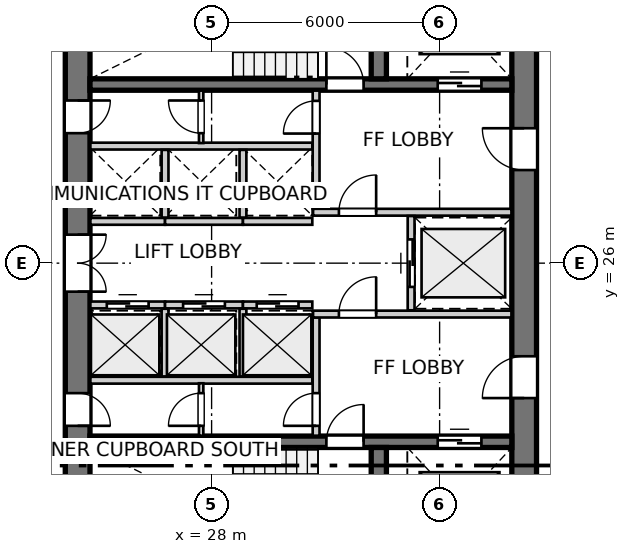
"""IFC4 building model, lengths in metres.
Left out: names, types, materials, properties, quantities, classifications, styles, units other than length and angle.
Written with IfcOpenShell. Run it as: python <this file> out.ifc"""

import sys

from ifc_helpers import new_model, si_unit, direction, frame, frame_2d, origin, place, context, subcontext, project, spatial, rectangle, extrude, source, transform, mapped, element, fill, save


model = new_model("IFC4")
c1 = context("Model", 3, precision=1e-05, world=origin(), true_north=direction((0.0, 1.0)))
c2 = subcontext(c1, "Body", "Model", "MODEL_VIEW")
j1 = project(units=[si_unit("LENGTHUNIT", "METRE"), si_unit("PLANEANGLEUNIT", "RADIAN")], contexts=[c1])
p1 = place(None, origin())
s1 = spatial("IfcSite", under=j1, at=p1, CompositionType="ELEMENT")
p2 = place(p1, origin())
s2 = spatial("IfcBuilding", under=s1, at=p2, CompositionType="ELEMENT")
p3 = place(p2, frame((0.0, 0.0, 108.8)))
s3 = spatial("IfcBuildingStorey", under=s2, at=p3, CompositionType="ELEMENT", Elevation=108.8)
p4 = place(p3, frame((24.475, 33.8, 0.0), z_axis=(0.0, 0.0, 1.0), x_axis=(0.0, -1.0, 0.0)))
e1 = element("IfcWall", 1, at=p4, inside=s3, PredefinedType="SHEAR", context=c2, shape_type="SweptSolid", body=[
    extrude(rectangle(XDim=15.6, YDim=0.65, at=frame_2d((7.8, 0.0))), origin(), (0.0, 0.0, 1.0), 2.935),
])
p5 = place(p4, frame((7.05, 0.0, 0.0)))
e2 = element("IfcOpeningElement", 2, at=p5, cuts=e1, PredefinedType="OPENING", context=c2, shape_type="SweptSolid", body=[
    extrude(rectangle(XDim=1.5, YDim=2.15, at=frame_2d((0.75, 1.075))), frame((0.0, 0.335, 0.0), z_axis=(0.0, -1.0, 0.0), x_axis=(1.0, 0.0, 0.0)), (0.0, 0.0, 1.0), 0.67),
])
p6 = place(p4, frame((3.52, 0.0, 0.0)))
e3 = element("IfcOpeningElement", 3, at=p6, cuts=e1, PredefinedType="OPENING", context=c2, shape_type="SweptSolid", body=[
    extrude(rectangle(XDim=0.86, YDim=2.05, at=frame_2d((0.43, 1.025))), frame((0.0, 0.335, 0.0), z_axis=(0.0, -1.0, 0.0), x_axis=(1.0, 0.0, 0.0)), (0.0, 0.0, 1.0), 0.67),
])
p7 = place(p4, frame((11.22, 0.0, 0.0)))
e4 = element("IfcOpeningElement", 4, at=p7, cuts=e1, PredefinedType="OPENING", context=c2, shape_type="SweptSolid", body=[
    extrude(rectangle(XDim=0.86, YDim=2.05, at=frame_2d((0.43, 1.025))), frame((0.0, 0.335, 0.0), z_axis=(0.0, -1.0, 0.0), x_axis=(1.0, 0.0, 0.0)), (0.0, 0.0, 1.0), 0.67),
])
p8 = place(p3, frame((36.225, 18.2, 0.0), z_axis=(0.0, 0.0, 1.0), x_axis=(0.0, 1.0, 0.0)))
e5 = element("IfcWall", 5, at=p8, inside=s3, PredefinedType="SHEAR", context=c2, shape_type="SweptSolid", body=[
    extrude(rectangle(XDim=15.6, YDim=0.65, at=frame_2d((7.8, 0.0))), origin(), (0.0, 0.0, 1.0), 2.935),
])
p9 = place(p8, frame((4.25, 0.0, 0.0)))
e6 = element("IfcOpeningElement", 6, at=p9, cuts=e5, PredefinedType="OPENING", context=c2, shape_type="SweptSolid", body=[
    extrude(rectangle(XDim=1.1, YDim=2.15, at=frame_2d((0.55, 1.075))), frame((0.0, 0.335, 0.0), z_axis=(0.0, -1.0, 0.0), x_axis=(1.0, 0.0, 0.0)), (0.0, 0.0, 1.0), 0.67),
])
p10 = place(p8, frame((10.25, 0.0, 0.0)))
e7 = element("IfcOpeningElement", 7, at=p10, cuts=e5, PredefinedType="OPENING", context=c2, shape_type="SweptSolid", body=[
    extrude(rectangle(XDim=1.1, YDim=2.15, at=frame_2d((0.55, 1.075))), frame((0.0, 0.335, 0.0), z_axis=(0.0, -1.0, 0.0), x_axis=(1.0, 0.0, 0.0)), (0.0, 0.0, 1.0), 0.67),
])
p11 = place(p3, frame((24.8, 21.3, 0.0), z_axis=(0.0, 0.0, 1.0), x_axis=(1.0, 0.0, 0.0)))
e8 = element("IfcWall", 8, at=p11, inside=s3, PredefinedType="SHEAR", context=c2, shape_type="SweptSolid", body=[
    extrude(rectangle(XDim=11.1, YDim=0.3, at=frame_2d((5.55, 0.0))), origin(), (0.0, 0.0, 1.0), 2.935),
])
p12 = place(p11, frame((6.22, 0.0, 0.0)))
e9 = element("IfcOpeningElement", 9, at=p12, cuts=e8, PredefinedType="OPENING", context=c2, shape_type="SweptSolid", body=[
    extrude(rectangle(XDim=0.98, YDim=2.15, at=frame_2d((0.49, 1.075))), frame((0.0, 0.16, 0.0), z_axis=(0.0, -1.0, 0.0), x_axis=(1.0, 0.0, 0.0)), (0.0, 0.0, 1.0), 0.32),
])
p13 = place(p11, frame((9.15, 0.0, 0.0)))
e10 = element("IfcOpeningElement", 10, at=p13, cuts=e8, PredefinedType="OPENING", context=c2, shape_type="SweptSolid", body=[
    extrude(rectangle(XDim=1.15, YDim=2.15, at=frame_2d((0.575, 1.075))), frame((0.0, 0.16, 0.0), z_axis=(0.0, -1.0, 0.0), x_axis=(1.0, 0.0, 0.0)), (0.0, 0.0, 1.0), 0.32),
])
p14 = place(p3, frame((32.4, 18.2, 0.0), z_axis=(0.0, 0.0, 1.0), x_axis=(0.0, 1.0, 0.0)))
e11 = element("IfcWall", 11, at=p14, inside=s3, PredefinedType="SHEAR", context=c2, shape_type="SweptSolid", body=[
    extrude(rectangle(XDim=2.95, YDim=0.4, at=frame_2d((1.475, 0.0))), origin(), (0.0, 0.0, 1.0), 2.935),
])
p15 = place(p3, frame((24.8, 30.7, 0.0), z_axis=(0.0, 0.0, 1.0), x_axis=(1.0, 0.0, 0.0)))
e12 = element("IfcWall", 12, at=p15, inside=s3, PredefinedType="SHEAR", context=c2, shape_type="SweptSolid", body=[
    extrude(rectangle(XDim=11.1, YDim=0.3, at=frame_2d((5.55, 0.0))), origin(), (0.0, 0.0, 1.0), 2.935),
])
p16 = place(p15, frame((6.22, 0.0, 0.0)))
e13 = element("IfcOpeningElement", 13, at=p16, cuts=e12, PredefinedType="OPENING", context=c2, shape_type="SweptSolid", body=[
    extrude(rectangle(XDim=0.98, YDim=2.15, at=frame_2d((0.49, 1.075))), frame((0.0, 0.16, 0.0), z_axis=(0.0, -1.0, 0.0), x_axis=(1.0, 0.0, 0.0)), (0.0, 0.0, 1.0), 0.32),
])
p17 = place(p15, frame((9.15, 0.0, 0.0)))
e14 = element("IfcOpeningElement", 14, at=p17, cuts=e12, PredefinedType="OPENING", context=c2, shape_type="SweptSolid", body=[
    extrude(rectangle(XDim=1.15, YDim=2.15, at=frame_2d((0.575, 1.075))), frame((0.0, 0.16, 0.0), z_axis=(0.0, -1.0, 0.0), x_axis=(1.0, 0.0, 0.0)), (0.0, 0.0, 1.0), 0.32),
])
p18 = place(p3, frame((32.4, 30.85, 0.0), z_axis=(0.0, 0.0, 1.0), x_axis=(0.0, 1.0, 0.0)))
e15 = element("IfcWall", 15, at=p18, inside=s3, PredefinedType="SHEAR", context=c2, shape_type="SweptSolid", body=[
    extrude(rectangle(XDim=2.95, YDim=0.4, at=frame_2d((1.475, 0.0))), origin(), (0.0, 0.0, 1.0), 2.935),
])
p19 = place(p3, frame((30.75, 21.46, 0.0), z_axis=(0.0, 0.0, 1.0), x_axis=(0.0, 1.0, 0.0)))
e16 = element("IfcWall", 16, at=p19, inside=s3, PredefinedType="PARTITIONING", context=c2, shape_type="SweptSolid", body=[
    extrude(rectangle(XDim=3.11, YDim=0.18, at=frame_2d((1.555, 0.0))), origin(), (0.0, 0.0, 1.0), 2.935),
])
p20 = place(p19, frame((0.26, 0.0, 0.0)))
e17 = element("IfcOpeningElement", 17, at=p20, cuts=e16, PredefinedType="OPENING", context=c2, shape_type="SweptSolid", body=[
    extrude(rectangle(XDim=0.86, YDim=2.05, at=frame_2d((0.43, 1.025))), frame((0.0, 0.1, 0.0), z_axis=(0.0, -1.0, 0.0), x_axis=(1.0, 0.0, 0.0)), (0.0, 0.0, 1.0), 0.2),
])
p21 = place(p3, frame((30.67, 24.66, 0.0), z_axis=(0.0, 0.0, 1.0), x_axis=(1.0, 0.0, 0.0)))
e18 = element("IfcWall", 18, at=p21, inside=s3, PredefinedType="PARTITIONING", context=c2, shape_type="SweptSolid", body=[
    extrude(rectangle(XDim=5.22, YDim=0.18, at=frame_2d((2.61, 0.0))), origin(), (0.0, 0.0, 1.0), 2.935),
])
p22 = place(p21, frame((0.68, 0.0, 0.0)))
e19 = element("IfcOpeningElement", 19, at=p22, cuts=e18, PredefinedType="OPENING", context=c2, shape_type="SweptSolid", body=[
    extrude(rectangle(XDim=0.98, YDim=2.15, at=frame_2d((0.49, 1.075))), frame((0.0, 0.1, 0.0), z_axis=(0.0, -1.0, 0.0), x_axis=(1.0, 0.0, 0.0)), (0.0, 0.0, 1.0), 0.2),
])
p23 = place(p3, frame((30.75, 27.43, 0.0), z_axis=(0.0, 0.0, 1.0), x_axis=(0.0, 1.0, 0.0)))
e20 = element("IfcWall", 20, at=p23, inside=s3, PredefinedType="PARTITIONING", context=c2, shape_type="SweptSolid", body=[
    extrude(rectangle(XDim=3.11, YDim=0.18, at=frame_2d((1.555, 0.0))), origin(), (0.0, 0.0, 1.0), 2.935),
])
p24 = place(p23, frame((1.98, 0.0, 0.0)))
e21 = element("IfcOpeningElement", 21, at=p24, cuts=e20, PredefinedType="OPENING", context=c2, shape_type="SweptSolid", body=[
    extrude(rectangle(XDim=0.86, YDim=2.05, at=frame_2d((0.43, 1.025))), frame((0.0, 0.1, 0.0), z_axis=(0.0, -1.0, 0.0), x_axis=(1.0, 0.0, 0.0)), (0.0, 0.0, 1.0), 0.2),
])
p25 = place(p3, frame((30.67, 27.34, 0.0), z_axis=(0.0, 0.0, 1.0), x_axis=(1.0, 0.0, 0.0)))
e22 = element("IfcWall", 22, at=p25, inside=s3, PredefinedType="PARTITIONING", context=c2, shape_type="SweptSolid", body=[
    extrude(rectangle(XDim=5.22, YDim=0.18, at=frame_2d((2.61, 0.0))), origin(), (0.0, 0.0, 1.0), 2.935),
])
p26 = place(p25, frame((0.68, 0.0, 0.0)))
e23 = element("IfcOpeningElement", 23, at=p26, cuts=e22, PredefinedType="OPENING", context=c2, shape_type="SweptSolid", body=[
    extrude(rectangle(XDim=0.98, YDim=2.15, at=frame_2d((0.49, 1.075))), frame((0.0, 0.1, 0.0), z_axis=(0.0, -1.0, 0.0), x_axis=(1.0, 0.0, 0.0)), (0.0, 0.0, 1.0), 0.2),
])
p27 = place(p3, frame((33.25, 24.76, 0.0), z_axis=(0.0, 0.0, 1.0), x_axis=(0.0, 1.0, 0.0)))
e24 = element("IfcWall", 24, at=p27, inside=s3, PredefinedType="PARTITIONING", context=c2, shape_type="SweptSolid", body=[
    extrude(rectangle(XDim=2.48, YDim=0.18, at=frame_2d((1.24, 0.0))), origin(), (0.0, 0.0, 1.0), 2.935),
])
p28 = place(p27, frame((0.615, 0.0, 0.0)))
e25 = element("IfcOpeningElement", 25, at=p28, cuts=e24, PredefinedType="OPENING", context=c2, shape_type="SweptSolid", body=[
    extrude(rectangle(XDim=1.25, YDim=2.15, at=frame_2d((0.625, 1.075))), frame((0.0, 0.1, 0.0), z_axis=(0.0, -1.0, 0.0), x_axis=(1.0, 0.0, 0.0)), (0.0, 0.0, 1.0), 0.2),
])
p29 = place(p3, frame((24.81, 22.92, 0.0), z_axis=(0.0, 0.0, 1.0), x_axis=(1.0, 0.0, 0.0)))
e26 = element("IfcWall", 26, at=p29, inside=s3, PredefinedType="PARTITIONING", context=c2, shape_type="SweptSolid", body=[
    extrude(rectangle(XDim=5.84, YDim=0.18, at=frame_2d((2.92, 0.0))), origin(), (0.0, 0.0, 1.0), 2.935),
])
p30 = place(p3, frame((24.81, 24.9, 0.0), z_axis=(0.0, 0.0, 1.0), x_axis=(1.0, 0.0, 0.0)))
e27 = element("IfcWall", 27, at=p30, inside=s3, PredefinedType="PARTITIONING", context=c2, shape_type="SweptSolid", body=[
    extrude(rectangle(XDim=1.965, YDim=0.18, at=frame_2d((0.982, 0.0))), origin(), (0.0, 0.0, 1.0), 2.935),
])
p31 = place(p30, frame((0.433, 0.0, 0.0)))
e28 = element("IfcOpeningElement", 28, at=p31, cuts=e27, PredefinedType="OPENING", context=c2, shape_type="SweptSolid", body=[
    extrude(rectangle(XDim=1.1, YDim=2.15, at=frame_2d((0.55, 1.075))), frame((0.0, 0.1, 0.0), z_axis=(0.0, -1.0, 0.0), x_axis=(1.0, 0.0, 0.0)), (0.0, 0.0, 1.0), 0.2),
])
p32 = place(p3, frame((26.775, 24.9, 0.0), z_axis=(0.0, 0.0, 1.0), x_axis=(1.0, 0.0, 0.0)))
e29 = element("IfcWall", 29, at=p32, inside=s3, PredefinedType="PARTITIONING", context=c2, shape_type="SweptSolid", body=[
    extrude(rectangle(XDim=2.05, YDim=0.18, at=frame_2d((1.025, 0.0))), origin(), (0.0, 0.0, 1.0), 2.935),
])
p33 = place(p32, frame((0.475, 0.0, 0.0)))
e30 = element("IfcOpeningElement", 30, at=p33, cuts=e29, PredefinedType="OPENING", context=c2, shape_type="SweptSolid", body=[
    extrude(rectangle(XDim=1.1, YDim=2.15, at=frame_2d((0.55, 1.075))), frame((0.0, 0.1, 0.0), z_axis=(0.0, -1.0, 0.0), x_axis=(1.0, 0.0, 0.0)), (0.0, 0.0, 1.0), 0.2),
])
p34 = place(p3, frame((26.775, 23.02, 0.0), z_axis=(0.0, 0.0, 1.0), x_axis=(0.0, 1.0, 0.0)))
e31 = element("IfcWall", 31, at=p34, inside=s3, PredefinedType="PARTITIONING", context=c2, shape_type="SweptSolid", body=[
    extrude(rectangle(XDim=1.78, YDim=0.18, at=frame_2d((0.89, 0.0))), origin(), (0.0, 0.0, 1.0), 2.935),
])
p35 = place(p3, frame((28.825, 24.9, 0.0), z_axis=(0.0, 0.0, 1.0), x_axis=(1.0, 0.0, 0.0)))
e32 = element("IfcWall", 32, at=p35, inside=s3, PredefinedType="PARTITIONING", context=c2, shape_type="SweptSolid", body=[
    extrude(rectangle(XDim=1.825, YDim=0.18, at=frame_2d((0.913, 0.0))), origin(), (0.0, 0.0, 1.0), 2.935),
])
p36 = place(p35, frame((0.363, 0.0, 0.0)))
e33 = element("IfcOpeningElement", 33, at=p36, cuts=e32, PredefinedType="OPENING", context=c2, shape_type="SweptSolid", body=[
    extrude(rectangle(XDim=1.1, YDim=2.15, at=frame_2d((0.55, 1.075))), frame((0.0, 0.1, 0.0), z_axis=(0.0, -1.0, 0.0), x_axis=(1.0, 0.0, 0.0)), (0.0, 0.0, 1.0), 0.2),
])
p37 = place(p3, frame((28.825, 23.02, 0.0), z_axis=(0.0, 0.0, 1.0), x_axis=(0.0, 1.0, 0.0)))
e34 = element("IfcWall", 34, at=p37, inside=s3, PredefinedType="PARTITIONING", context=c2, shape_type="SweptSolid", body=[
    extrude(rectangle(XDim=1.78, YDim=0.18, at=frame_2d((0.89, 0.0))), origin(), (0.0, 0.0, 1.0), 2.935),
])
p38 = place(p3, frame((24.81, 29.08, 0.0), z_axis=(0.0, 0.0, 1.0), x_axis=(1.0, 0.0, 0.0)))
e35 = element("IfcWall", 35, at=p38, inside=s3, PredefinedType="PARTITIONING", context=c2, shape_type="SweptSolid", body=[
    extrude(rectangle(XDim=5.84, YDim=0.18, at=frame_2d((2.92, 0.0))), origin(), (0.0, 0.0, 1.0), 2.935),
])
p39 = place(p3, frame((24.81, 27.1, 0.0), z_axis=(0.0, 0.0, 1.0), x_axis=(1.0, 0.0, 0.0)))
e36 = element("IfcWall", 36, at=p39, inside=s3, PredefinedType="PARTITIONING", context=c2, shape_type="SweptSolid", body=[
    extrude(rectangle(XDim=1.965, YDim=0.18, at=frame_2d((0.982, 0.0))), origin(), (0.0, 0.0, 1.0), 2.935),
])
p40 = place(p3, frame((26.775, 27.1, 0.0), z_axis=(0.0, 0.0, 1.0), x_axis=(1.0, 0.0, 0.0)))
e37 = element("IfcWall", 37, at=p40, inside=s3, PredefinedType="PARTITIONING", context=c2, shape_type="SweptSolid", body=[
    extrude(rectangle(XDim=2.05, YDim=0.18, at=frame_2d((1.025, 0.0))), origin(), (0.0, 0.0, 1.0), 2.935),
])
p41 = place(p3, frame((26.775, 27.2, 0.0), z_axis=(0.0, 0.0, 1.0), x_axis=(0.0, 1.0, 0.0)))
e38 = element("IfcWall", 38, at=p41, inside=s3, PredefinedType="PARTITIONING", context=c2, shape_type="SweptSolid", body=[
    extrude(rectangle(XDim=1.78, YDim=0.18, at=frame_2d((0.89, 0.0))), origin(), (0.0, 0.0, 1.0), 2.935),
])
p42 = place(p3, frame((28.825, 27.1, 0.0), z_axis=(0.0, 0.0, 1.0), x_axis=(1.0, 0.0, 0.0)))
e39 = element("IfcWall", 39, at=p42, inside=s3, PredefinedType="PARTITIONING", context=c2, shape_type="SweptSolid", body=[
    extrude(rectangle(XDim=1.825, YDim=0.18, at=frame_2d((0.913, 0.0))), origin(), (0.0, 0.0, 1.0), 2.935),
])
p43 = place(p3, frame((28.825, 27.2, 0.0), z_axis=(0.0, 0.0, 1.0), x_axis=(0.0, 1.0, 0.0)))
e40 = element("IfcWall", 40, at=p43, inside=s3, PredefinedType="PARTITIONING", context=c2, shape_type="SweptSolid", body=[
    extrude(rectangle(XDim=1.78, YDim=0.18, at=frame_2d((0.89, 0.0))), origin(), (0.0, 0.0, 1.0), 2.935),
])
p44 = place(p3, frame((27.725, 21.46, 0.0), z_axis=(0.0, 0.0, 1.0), x_axis=(0.0, 1.0, 0.0)))
e41 = element("IfcWall", 41, at=p44, inside=s3, PredefinedType="PARTITIONING", context=c2, shape_type="SweptSolid", body=[
    extrude(rectangle(XDim=1.38, YDim=0.115, at=frame_2d((0.69, 0.0))), origin(), (0.0, 0.0, 1.0), 2.935),
])
p45 = place(p44, frame((0.26, 0.0, 0.0)))
e42 = element("IfcOpeningElement", 42, at=p45, cuts=e41, PredefinedType="OPENING", context=c2, shape_type="SweptSolid", body=[
    extrude(rectangle(XDim=0.86, YDim=2.05, at=frame_2d((0.43, 1.025))), frame((0.0, 0.067, 0.0), z_axis=(0.0, -1.0, 0.0), x_axis=(1.0, 0.0, 0.0)), (0.0, 0.0, 1.0), 0.135),
])
p46 = place(p3, frame((27.725, 29.16, 0.0), z_axis=(0.0, 0.0, 1.0), x_axis=(0.0, 1.0, 0.0)))
e43 = element("IfcWall", 43, at=p46, inside=s3, PredefinedType="PARTITIONING", context=c2, shape_type="SweptSolid", body=[
    extrude(rectangle(XDim=1.38, YDim=0.115, at=frame_2d((0.69, 0.0))), origin(), (0.0, 0.0, 1.0), 2.935),
])
p47 = place(p46, frame((0.26, 0.0, 0.0)))
e44 = element("IfcOpeningElement", 44, at=p47, cuts=e43, PredefinedType="OPENING", context=c2, shape_type="SweptSolid", body=[
    extrude(rectangle(XDim=0.86, YDim=2.05, at=frame_2d((0.43, 1.025))), frame((0.0, 0.067, 0.0), z_axis=(0.0, -1.0, 0.0), x_axis=(1.0, 0.0, 0.0)), (0.0, 0.0, 1.0), 0.135),
])
m1 = source(origin(), c2, "Body", "SweptSolid", [
    extrude(rectangle(XDim=0.98, YDim=2.15, at=frame_2d((0.49, 1.075))), frame((0.0, 0.025, 0.0), z_axis=(0.0, -1.0, 0.0), x_axis=(1.0, 0.0, 0.0)), (0.0, 0.0, 1.0), 0.05),
])
p48 = place(p12, origin())
e45 = element("IfcDoor", 45, at=p48, inside=s3, OperationType="SINGLE_SWING_RIGHT", PredefinedType="DOOR", context=c2, shape_type="MappedRepresentation", body=[
    mapped(m1, transform((0.0, 0.0, 0.0), x_axis=(1.0, 0.0, 0.0), y_axis=(0.0, 1.0, 0.0), z_axis=(0.0, 0.0, 1.0), scale=1.0)),
])
fill(e9, e45)
m2 = source(origin(), c2, "Body", "SweptSolid", [
    extrude(rectangle(XDim=1.15, YDim=2.15, at=frame_2d((0.575, 1.075))), frame((0.0, 0.025, 0.0), z_axis=(0.0, -1.0, 0.0), x_axis=(1.0, 0.0, 0.0)), (0.0, 0.0, 1.0), 0.05),
])
p49 = place(p13, origin())
e46 = element("IfcDoor", 46, at=p49, inside=s3, OperationType="DOUBLE_DOOR_SLIDING", PredefinedType="DOOR", context=c2, shape_type="MappedRepresentation", body=[
    mapped(m2, transform((0.0, 0.0, 0.0), x_axis=(1.0, 0.0, 0.0), y_axis=(0.0, 1.0, 0.0), z_axis=(0.0, 0.0, 1.0), scale=1.0)),
])
fill(e10, e46)
p50 = place(p16, origin())
e47 = element("IfcDoor", 47, at=p50, inside=s3, OperationType="SINGLE_SWING_LEFT", PredefinedType="DOOR", context=c2, shape_type="MappedRepresentation", body=[
    mapped(m1, transform((0.0, 0.0, 0.0), x_axis=(1.0, 0.0, 0.0), y_axis=(0.0, 1.0, 0.0), z_axis=(0.0, 0.0, 1.0), scale=1.0)),
])
fill(e13, e47)
p51 = place(p17, origin())
e48 = element("IfcDoor", 48, at=p51, inside=s3, OperationType="DOUBLE_DOOR_SLIDING", PredefinedType="DOOR", context=c2, shape_type="MappedRepresentation", body=[
    mapped(m2, transform((0.0, 0.0, 0.0), x_axis=(1.0, 0.0, 0.0), y_axis=(0.0, 1.0, 0.0), z_axis=(0.0, 0.0, 1.0), scale=1.0)),
])
fill(e14, e48)
m3 = source(origin(), c2, "Body", "SweptSolid", [
    extrude(rectangle(XDim=1.1, YDim=2.15, at=frame_2d((0.55, 1.075))), frame((0.0, 0.025, 0.0), z_axis=(0.0, -1.0, 0.0), x_axis=(1.0, 0.0, 0.0)), (0.0, 0.0, 1.0), 0.05),
])
p52 = place(p9, origin())
e49 = element("IfcDoor", 49, at=p52, inside=s3, OperationType="SINGLE_SWING_LEFT", PredefinedType="DOOR", context=c2, shape_type="MappedRepresentation", body=[
    mapped(m3, transform((0.0, 0.0, 0.0), x_axis=(1.0, 0.0, 0.0), y_axis=(0.0, 1.0, 0.0), z_axis=(0.0, 0.0, 1.0), scale=1.0)),
])
fill(e6, e49)
p53 = place(p10, origin())
e50 = element("IfcDoor", 50, at=p53, inside=s3, OperationType="SINGLE_SWING_RIGHT", PredefinedType="DOOR", context=c2, shape_type="MappedRepresentation", body=[
    mapped(m3, transform((0.0, 0.0, 0.0), x_axis=(1.0, 0.0, 0.0), y_axis=(0.0, 1.0, 0.0), z_axis=(0.0, 0.0, 1.0), scale=1.0)),
])
fill(e7, e50)
m4 = source(origin(), c2, "Body", "SweptSolid", [
    extrude(rectangle(XDim=1.5, YDim=2.15, at=frame_2d((0.75, 1.075))), frame((0.0, 0.025, 0.0), z_axis=(0.0, -1.0, 0.0), x_axis=(1.0, 0.0, 0.0)), (0.0, 0.0, 1.0), 0.05),
])
p54 = place(p5, origin())
e51 = element("IfcDoor", 51, at=p54, inside=s3, OperationType="DOUBLE_DOOR_SINGLE_SWING", PredefinedType="DOOR", context=c2, shape_type="MappedRepresentation", body=[
    mapped(m4, transform((0.0, 0.0, 0.0), x_axis=(1.0, 0.0, 0.0), y_axis=(0.0, 1.0, 0.0), z_axis=(0.0, 0.0, 1.0), scale=1.0)),
])
fill(e2, e51)
m5 = source(origin(), c2, "Body", "SweptSolid", [
    extrude(rectangle(XDim=0.86, YDim=2.05, at=frame_2d((0.43, 1.025))), frame((0.0, 0.025, 0.0), z_axis=(0.0, -1.0, 0.0), x_axis=(1.0, 0.0, 0.0)), (0.0, 0.0, 1.0), 0.05),
])
p55 = place(p6, origin())
e52 = element("IfcDoor", 52, at=p55, inside=s3, OperationType="SINGLE_SWING_LEFT", PredefinedType="DOOR", context=c2, shape_type="MappedRepresentation", body=[
    mapped(m5, transform((0.0, 0.0, 0.0), x_axis=(1.0, 0.0, 0.0), y_axis=(0.0, 1.0, 0.0), z_axis=(0.0, 0.0, 1.0), scale=1.0)),
])
fill(e3, e52)
p56 = place(p7, origin())
e53 = element("IfcDoor", 53, at=p56, inside=s3, OperationType="SINGLE_SWING_RIGHT", PredefinedType="DOOR", context=c2, shape_type="MappedRepresentation", body=[
    mapped(m5, transform((0.0, 0.0, 0.0), x_axis=(1.0, 0.0, 0.0), y_axis=(0.0, 1.0, 0.0), z_axis=(0.0, 0.0, 1.0), scale=1.0)),
])
fill(e4, e53)
p57 = place(p20, origin())
e54 = element("IfcDoor", 54, at=p57, inside=s3, OperationType="SINGLE_SWING_LEFT", PredefinedType="DOOR", context=c2, shape_type="MappedRepresentation", body=[
    mapped(m5, transform((0.0, 0.0, 0.0), x_axis=(1.0, 0.0, 0.0), y_axis=(0.0, 1.0, 0.0), z_axis=(0.0, 0.0, 1.0), scale=1.0)),
])
fill(e17, e54)
p58 = place(p22, origin())
e55 = element("IfcDoor", 55, at=p58, inside=s3, OperationType="SINGLE_SWING_RIGHT", PredefinedType="DOOR", context=c2, shape_type="MappedRepresentation", body=[
    mapped(m1, transform((0.0, 0.0, 0.0), x_axis=(1.0, 0.0, 0.0), y_axis=(0.0, 1.0, 0.0), z_axis=(0.0, 0.0, 1.0), scale=1.0)),
])
fill(e19, e55)
p59 = place(p24, origin())
e56 = element("IfcDoor", 56, at=p59, inside=s3, OperationType="SINGLE_SWING_LEFT", PredefinedType="DOOR", context=c2, shape_type="MappedRepresentation", body=[
    mapped(m5, transform((0.0, 0.0, 0.0), x_axis=(1.0, 0.0, 0.0), y_axis=(0.0, 1.0, 0.0), z_axis=(0.0, 0.0, 1.0), scale=1.0)),
])
fill(e21, e56)
p60 = place(p26, origin())
e57 = element("IfcDoor", 57, at=p60, inside=s3, OperationType="SINGLE_SWING_RIGHT", PredefinedType="DOOR", context=c2, shape_type="MappedRepresentation", body=[
    mapped(m1, transform((0.0, 0.0, 0.0), x_axis=(1.0, 0.0, 0.0), y_axis=(0.0, 1.0, 0.0), z_axis=(0.0, 0.0, 1.0), scale=1.0)),
])
fill(e23, e57)
m6 = source(origin(), c2, "Body", "SweptSolid", [
    extrude(rectangle(XDim=1.25, YDim=2.15, at=frame_2d((0.625, 1.075))), frame((0.0, 0.025, 0.0), z_axis=(0.0, -1.0, 0.0), x_axis=(1.0, 0.0, 0.0)), (0.0, 0.0, 1.0), 0.05),
])
p61 = place(p28, origin())
e58 = element("IfcDoor", 58, at=p61, inside=s3, OperationType="DOUBLE_DOOR_SLIDING", PredefinedType="DOOR", context=c2, shape_type="MappedRepresentation", body=[
    mapped(m6, transform((0.0, 0.0, 0.0), x_axis=(1.0, 0.0, 0.0), y_axis=(0.0, 1.0, 0.0), z_axis=(0.0, 0.0, 1.0), scale=1.0)),
])
fill(e25, e58)
p62 = place(p31, origin())
e59 = element("IfcDoor", 59, at=p62, inside=s3, OperationType="DOUBLE_DOOR_SLIDING", PredefinedType="DOOR", context=c2, shape_type="MappedRepresentation", body=[
    mapped(m3, transform((0.0, 0.0, 0.0), x_axis=(1.0, 0.0, 0.0), y_axis=(0.0, 1.0, 0.0), z_axis=(0.0, 0.0, 1.0), scale=1.0)),
])
fill(e28, e59)
p63 = place(p33, origin())
e60 = element("IfcDoor", 60, at=p63, inside=s3, OperationType="DOUBLE_DOOR_SLIDING", PredefinedType="DOOR", context=c2, shape_type="MappedRepresentation", body=[
    mapped(m3, transform((0.0, 0.0, 0.0), x_axis=(1.0, 0.0, 0.0), y_axis=(0.0, 1.0, 0.0), z_axis=(0.0, 0.0, 1.0), scale=1.0)),
])
fill(e30, e60)
p64 = place(p36, origin())
e61 = element("IfcDoor", 61, at=p64, inside=s3, OperationType="DOUBLE_DOOR_SLIDING", PredefinedType="DOOR", context=c2, shape_type="MappedRepresentation", body=[
    mapped(m3, transform((0.0, 0.0, 0.0), x_axis=(1.0, 0.0, 0.0), y_axis=(0.0, 1.0, 0.0), z_axis=(0.0, 0.0, 1.0), scale=1.0)),
])
fill(e33, e61)
p65 = place(p45, origin())
e62 = element("IfcDoor", 62, at=p65, inside=s3, OperationType="SINGLE_SWING_LEFT", PredefinedType="DOOR", context=c2, shape_type="MappedRepresentation", body=[
    mapped(m5, transform((0.0, 0.0, 0.0), x_axis=(1.0, 0.0, 0.0), y_axis=(0.0, 1.0, 0.0), z_axis=(0.0, 0.0, 1.0), scale=1.0)),
])
fill(e42, e62)
p66 = place(p47, origin())
e63 = element("IfcDoor", 63, at=p66, inside=s3, OperationType="SINGLE_SWING_RIGHT", PredefinedType="DOOR", context=c2, shape_type="MappedRepresentation", body=[
    mapped(m5, transform((0.0, 0.0, 0.0), x_axis=(1.0, 0.0, 0.0), y_axis=(0.0, 1.0, 0.0), z_axis=(0.0, 0.0, 1.0), scale=1.0)),
])
fill(e44, e63)
save(model, sys.argv[1])
